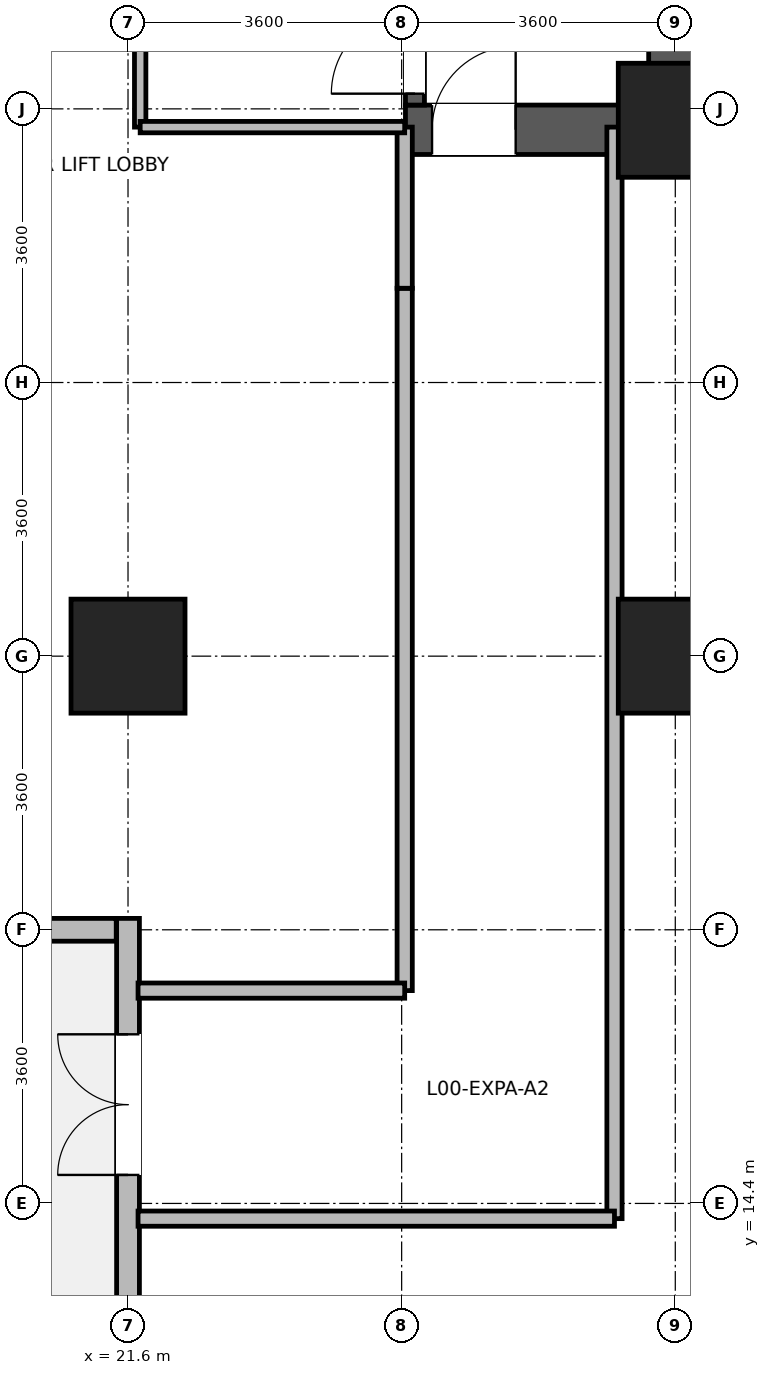
"""IFC4 building model, lengths in metres.
Left out: names, types, materials, properties, quantities, classifications, styles, units other than length and angle.
Written with IfcOpenShell. Run it as: python <this file> out.ifc"""

import sys

from ifc_helpers import new_model, si_unit, direction, frame, frame_2d, origin, origin_2d, place, context, subcontext, project, spatial, rectangle, extrude, source, transform, mapped, element, fill, save


model = new_model("IFC4")
c1 = context("Model", 3, precision=1e-05, world=origin(), true_north=direction((0.0, 1.0)))
c2 = subcontext(c1, "Body", "Model", "MODEL_VIEW")
j1 = project(units=[si_unit("LENGTHUNIT", "METRE"), si_unit("PLANEANGLEUNIT", "RADIAN")], contexts=[c1])
p1 = place(None, origin())
s1 = spatial("IfcSite", under=j1, at=p1, CompositionType="ELEMENT")
p2 = place(p1, origin())
s2 = spatial("IfcBuilding", under=s1, at=p2, CompositionType="ELEMENT")
p3 = place(p2, origin())
s3 = spatial("IfcBuildingStorey", under=s2, at=p3, CompositionType="ELEMENT", Elevation=0.0)
p4 = place(p3, frame((28.775, 28.2, 0.0), z_axis=(0.0, 0.0, 1.0), x_axis=(0.0, 1.0, 0.0)))
e1 = element("IfcWall", 1, at=p4, inside=s3, PredefinedType="SHEAR", context=c2, shape_type="SweptSolid", body=[
    extrude(rectangle(XDim=8.3, YDim=0.65, at=frame_2d((4.15, 0.0))), origin(), (0.0, 0.0, 1.0), 5.12),
])
p5 = place(p3, frame((25.25, 28.525, 0.0), z_axis=(0.0, 0.0, 1.0), x_axis=(1.0, 0.0, 0.0)))
e2 = element("IfcWall", 2, at=p5, inside=s3, PredefinedType="SHEAR", context=c2, shape_type="SweptSolid", body=[
    extrude(rectangle(XDim=3.2, YDim=0.65, at=frame_2d((1.6, 0.0))), origin(), (0.0, 0.0, 1.0), 5.12),
])
p6 = place(p5, frame((0.35, 0.0, 0.0)))
e3 = element("IfcOpeningElement", 3, at=p6, cuts=e2, PredefinedType="OPENING", context=c2, shape_type="SweptSolid", body=[
    extrude(rectangle(XDim=1.1, YDim=2.08, at=frame_2d((0.55, 1.04))), frame((0.0, 0.335, 0.0), z_axis=(0.0, -1.0, 0.0), x_axis=(1.0, 0.0, 0.0)), (0.0, 0.0, 1.0), 0.67),
])
p7 = place(p3, frame((25.375, 28.85, 0.0), z_axis=(0.0, 0.0, 1.0), x_axis=(0.0, 1.0, 0.0)))
e4 = element("IfcWall", 4, at=p7, inside=s3, PredefinedType="SHEAR", context=c2, shape_type="SweptSolid", body=[
    extrude(rectangle(XDim=7.0, YDim=0.25, at=frame_2d((3.5, 0.0))), origin(), (0.0, 0.0, 1.0), 5.12),
])
p8 = place(p7, frame((0.15, 0.0, 0.0)))
e5 = element("IfcOpeningElement", 5, at=p8, cuts=e4, PredefinedType="OPENING", context=c2, shape_type="SweptSolid", body=[
    extrude(rectangle(XDim=1.1, YDim=2.08, at=frame_2d((0.55, 1.04))), frame((0.0, 0.135, 0.0), z_axis=(0.0, -1.0, 0.0), x_axis=(1.0, 0.0, 0.0)), (0.0, 0.0, 1.0), 0.27),
])
m1 = source(origin(), c2, "Body", "SweptSolid", [
    extrude(rectangle(XDim=1.5, YDim=1.5, at=origin_2d()), origin(), (0.0, 0.0, 1.0), 5.4),
])
for number, where, z_axis, x_axis in (
    (6, (21.6, 21.6, 0.0), (0.0, 0.0, 1.0), (1.0, 0.0, 0.0)),
    (7, (28.8, 21.6, 0.0), (0.0, 0.0, 1.0), (1.0, 0.0, 0.0)),
    (8, (28.8, 28.65, 0.0), (0.0, 0.0, 1.0), (1.0, 0.0, 0.0)),
):
    element("IfcColumn", number, at=place(p3, frame(where, z_axis=z_axis, x_axis=x_axis)), inside=s3, PredefinedType="COLUMN", context=c2, shape_type="MappedRepresentation", body=[
        mapped(m1, transform((0.0, 0.0, 0.0), x_axis=(1.0, 0.0, 0.0), y_axis=(0.0, 1.0, 0.0), z_axis=(0.0, 0.0, 1.0), scale=1.0)),
    ])
p9 = place(p3, frame((21.445, 18.0, 0.0), z_axis=(0.0, 0.0, 1.0), x_axis=(-1.0, 0.0, 0.0)))
e9 = element("IfcWall", 9, at=p9, inside=s3, PredefinedType="STANDARD", context=c2, shape_type="SweptSolid", body=[
    extrude(rectangle(XDim=20.294, YDim=0.3, at=frame_2d((10.147, 0.0))), origin(), (0.0, 0.0, 1.0), 5.1),
])
p10 = place(p9, frame((4.02, 0.0, 0.0)))
e10 = element("IfcOpeningElement", 10, at=p10, cuts=e9, PredefinedType="OPENING", context=c2, shape_type="SweptSolid", body=[
    extrude(rectangle(XDim=1.85, YDim=2.25, at=frame_2d((0.925, 1.125))), frame((0.0, 0.16, 0.0), z_axis=(0.0, -1.0, 0.0), x_axis=(1.0, 0.0, 0.0)), (0.0, 0.0, 1.0), 0.32),
])
p11 = place(p9, frame((1.12, 0.0, 0.0)))
e11 = element("IfcOpeningElement", 11, at=p11, cuts=e9, PredefinedType="OPENING", context=c2, shape_type="SweptSolid", body=[
    extrude(rectangle(XDim=1.95, YDim=2.4, at=frame_2d((0.975, 1.2))), frame((0.0, 0.16, 0.0), z_axis=(0.0, -1.0, 0.0), x_axis=(1.0, 0.0, 0.0)), (0.0, 0.0, 1.0), 0.32),
])
p12 = place(p9, frame((7.256, 0.0, 0.9)))
e12 = element("IfcOpeningElement", 12, at=p12, cuts=e9, PredefinedType="OPENING", context=c2, shape_type="SweptSolid", body=[
    extrude(rectangle(XDim=2.4, YDim=2.5, at=frame_2d((1.2, 1.25))), frame((0.0, 0.16, 0.0), z_axis=(0.0, -1.0, 0.0), x_axis=(1.0, 0.0, 0.0)), (0.0, 0.0, 1.0), 0.32),
])
p13 = place(p9, frame((14.021, 0.0, 0.9)))
e13 = element("IfcOpeningElement", 13, at=p13, cuts=e9, PredefinedType="OPENING", context=c2, shape_type="SweptSolid", body=[
    extrude(rectangle(XDim=2.4, YDim=2.5, at=frame_2d((1.2, 1.25))), frame((0.0, 0.16, 0.0), z_axis=(0.0, -1.0, 0.0), x_axis=(1.0, 0.0, 0.0)), (0.0, 0.0, 1.0), 0.32),
])
p14 = place(p9, frame((17.403, 0.0, 0.9)))
e14 = element("IfcOpeningElement", 14, at=p14, cuts=e9, PredefinedType="OPENING", context=c2, shape_type="SweptSolid", body=[
    extrude(rectangle(XDim=2.4, YDim=2.5, at=frame_2d((1.2, 1.25))), frame((0.0, 0.16, 0.0), z_axis=(0.0, -1.0, 0.0), x_axis=(1.0, 0.0, 0.0)), (0.0, 0.0, 1.0), 0.32),
])
p15 = place(p3, frame((21.6, 1.65, 0.0), z_axis=(0.0, 0.0, 1.0), x_axis=(0.0, 1.0, 0.0)))
e15 = element("IfcWall", 15, at=p15, inside=s3, PredefinedType="STANDARD", context=c2, shape_type="SweptSolid", body=[
    extrude(rectangle(XDim=16.5, YDim=0.3, at=frame_2d((8.25, 0.0))), origin(), (0.0, 0.0, 1.0), 5.1),
])
p16 = place(p15, frame((13.125, 0.0, 0.0)))
e16 = element("IfcOpeningElement", 16, at=p16, cuts=e15, PredefinedType="OPENING", context=c2, shape_type="SweptSolid", body=[
    extrude(rectangle(XDim=1.85, YDim=2.25, at=frame_2d((0.925, 1.125))), frame((0.0, 0.16, 0.0), z_axis=(0.0, -1.0, 0.0), x_axis=(1.0, 0.0, 0.0)), (0.0, 0.0, 1.0), 0.32),
])
p17 = place(p15, frame((0.45, 0.0, 0.9)))
e17 = element("IfcOpeningElement", 17, at=p17, cuts=e15, PredefinedType="OPENING", context=c2, shape_type="SweptSolid", body=[
    extrude(rectangle(XDim=2.4, YDim=2.5, at=frame_2d((1.2, 1.25))), frame((0.0, 0.16, 0.0), z_axis=(0.0, -1.0, 0.0), x_axis=(1.0, 0.0, 0.0)), (0.0, 0.0, 1.0), 0.32),
])
p18 = place(p15, frame((7.05, 0.0, 0.9)))
e18 = element("IfcOpeningElement", 18, at=p18, cuts=e15, PredefinedType="OPENING", context=c2, shape_type="SweptSolid", body=[
    extrude(rectangle(XDim=2.4, YDim=2.5, at=frame_2d((1.2, 1.25))), frame((0.0, 0.16, 0.0), z_axis=(0.0, -1.0, 0.0), x_axis=(1.0, 0.0, 0.0)), (0.0, 0.0, 1.0), 0.32),
])
p19 = place(p3, frame((28.0, 14.2, 0.0), z_axis=(0.0, 0.0, 1.0), x_axis=(0.0, 1.0, 0.0)))
e19 = element("IfcWall", 19, at=p19, inside=s3, PredefinedType="PARTITIONING", context=c2, shape_type="SweptSolid", body=[
    extrude(rectangle(XDim=14.36, YDim=0.2, at=frame_2d((7.18, 0.0))), origin(), (0.0, 0.0, 1.0), 5.1),
])
p20 = place(p3, frame((25.24, 17.2, 0.0), z_axis=(0.0, 0.0, 1.0), x_axis=(0.0, 1.0, 0.0)))
e20 = element("IfcWall", 20, at=p20, inside=s3, PredefinedType="PARTITIONING", context=c2, shape_type="SweptSolid", body=[
    extrude(rectangle(XDim=9.24, YDim=0.2, at=frame_2d((4.62, 0.0))), origin(), (0.0, 0.0, 1.0), 5.1),
])
p21 = place(p3, frame((21.732, 14.2, 0.0), z_axis=(0.0, 0.0, 1.0), x_axis=(1.0, 0.0, 0.0)))
e21 = element("IfcWall", 21, at=p21, inside=s3, PredefinedType="PARTITIONING", context=c2, shape_type="SweptSolid", body=[
    extrude(rectangle(XDim=6.268, YDim=0.2, at=frame_2d((3.134, 0.0))), origin(), (0.0, 0.0, 1.0), 5.1),
])
p22 = place(p3, frame((21.732, 17.2, 0.0), z_axis=(0.0, 0.0, 1.0), x_axis=(1.0, 0.0, 0.0)))
e22 = element("IfcWall", 22, at=p22, inside=s3, PredefinedType="PARTITIONING", context=c2, shape_type="SweptSolid", body=[
    extrude(rectangle(XDim=3.508, YDim=0.2, at=frame_2d((1.754, 0.0))), origin(), (0.0, 0.0, 1.0), 5.1),
])
p23 = place(p3, frame((25.24, 26.44, 0.0), z_axis=(0.0, 0.0, 1.0), x_axis=(0.0, 1.0, 0.0)))
e23 = element("IfcWall", 23, at=p23, inside=s3, PredefinedType="PARTITIONING", context=c2, shape_type="SweptSolid", body=[
    extrude(rectangle(XDim=2.12, YDim=0.2, at=frame_2d((1.06, 0.0))), origin(), (0.0, 0.0, 1.0), 5.1),
])
p24 = place(p3, frame((21.76, 28.56, 0.0), z_axis=(0.0, 0.0, 1.0), x_axis=(0.0, 1.0, 0.0)))
e24 = element("IfcWall", 24, at=p24, inside=s3, PredefinedType="PARTITIONING", context=c2, shape_type="SweptSolid", body=[
    extrude(rectangle(XDim=4.6, YDim=0.15, at=frame_2d((2.3, 0.0))), origin(), (0.0, 0.0, 1.0), 5.1),
])
p25 = place(p24, frame((1.55, 0.0, 0.0)))
e25 = element("IfcOpeningElement", 25, at=p25, cuts=e24, PredefinedType="OPENING", context=c2, shape_type="SweptSolid", body=[
    extrude(rectangle(XDim=1.5, YDim=2.1, at=frame_2d((0.75, 1.05))), frame((0.0, 0.085, 0.0), z_axis=(0.0, -1.0, 0.0), x_axis=(1.0, 0.0, 0.0)), (0.0, 0.0, 1.0), 0.17),
])
p26 = place(p3, frame((21.76, 28.56, 0.0), z_axis=(0.0, 0.0, 1.0), x_axis=(1.0, 0.0, 0.0)))
e26 = element("IfcWall", 26, at=p26, inside=s3, PredefinedType="PARTITIONING", context=c2, shape_type="SweptSolid", body=[
    extrude(rectangle(XDim=3.48, YDim=0.15, at=frame_2d((1.74, 0.0))), origin(), (0.0, 0.0, 1.0), 3.9),
])
p27 = place(p16, origin())
e27 = element("IfcDoor", 27, at=p27, inside=s3, OperationType="DOUBLE_DOOR_SINGLE_SWING", PredefinedType="DOOR", context=c2, shape_type="SweptSolid", body=[
    extrude(rectangle(XDim=1.85, YDim=2.25, at=frame_2d((0.925, 1.125))), frame((0.0, 0.025, 0.0), z_axis=(0.0, -1.0, 0.0), x_axis=(1.0, 0.0, 0.0)), (0.0, 0.0, 1.0), 0.05),
])
fill(e16, e27)
p28 = place(p8, origin())
e28 = element("IfcDoor", 28, at=p28, inside=s3, OperationType="SINGLE_SWING_LEFT", PredefinedType="DOOR", context=c2, shape_type="SweptSolid", body=[
    extrude(rectangle(XDim=1.1, YDim=2.08, at=frame_2d((0.55, 1.04))), frame((0.0, 0.025, 0.0), z_axis=(0.0, -1.0, 0.0), x_axis=(1.0, 0.0, 0.0)), (0.0, 0.0, 1.0), 0.05),
])
fill(e5, e28)
p29 = place(p6, origin())
e29 = element("IfcDoor", 29, at=p29, inside=s3, OperationType="SINGLE_SWING_RIGHT", PredefinedType="DOOR", context=c2, shape_type="SweptSolid", body=[
    extrude(rectangle(XDim=1.1, YDim=2.08, at=frame_2d((0.55, 1.04))), frame((0.0, 0.025, 0.0), z_axis=(0.0, -1.0, 0.0), x_axis=(1.0, 0.0, 0.0)), (0.0, 0.0, 1.0), 0.05),
])
fill(e3, e29)
save(model, sys.argv[1])
